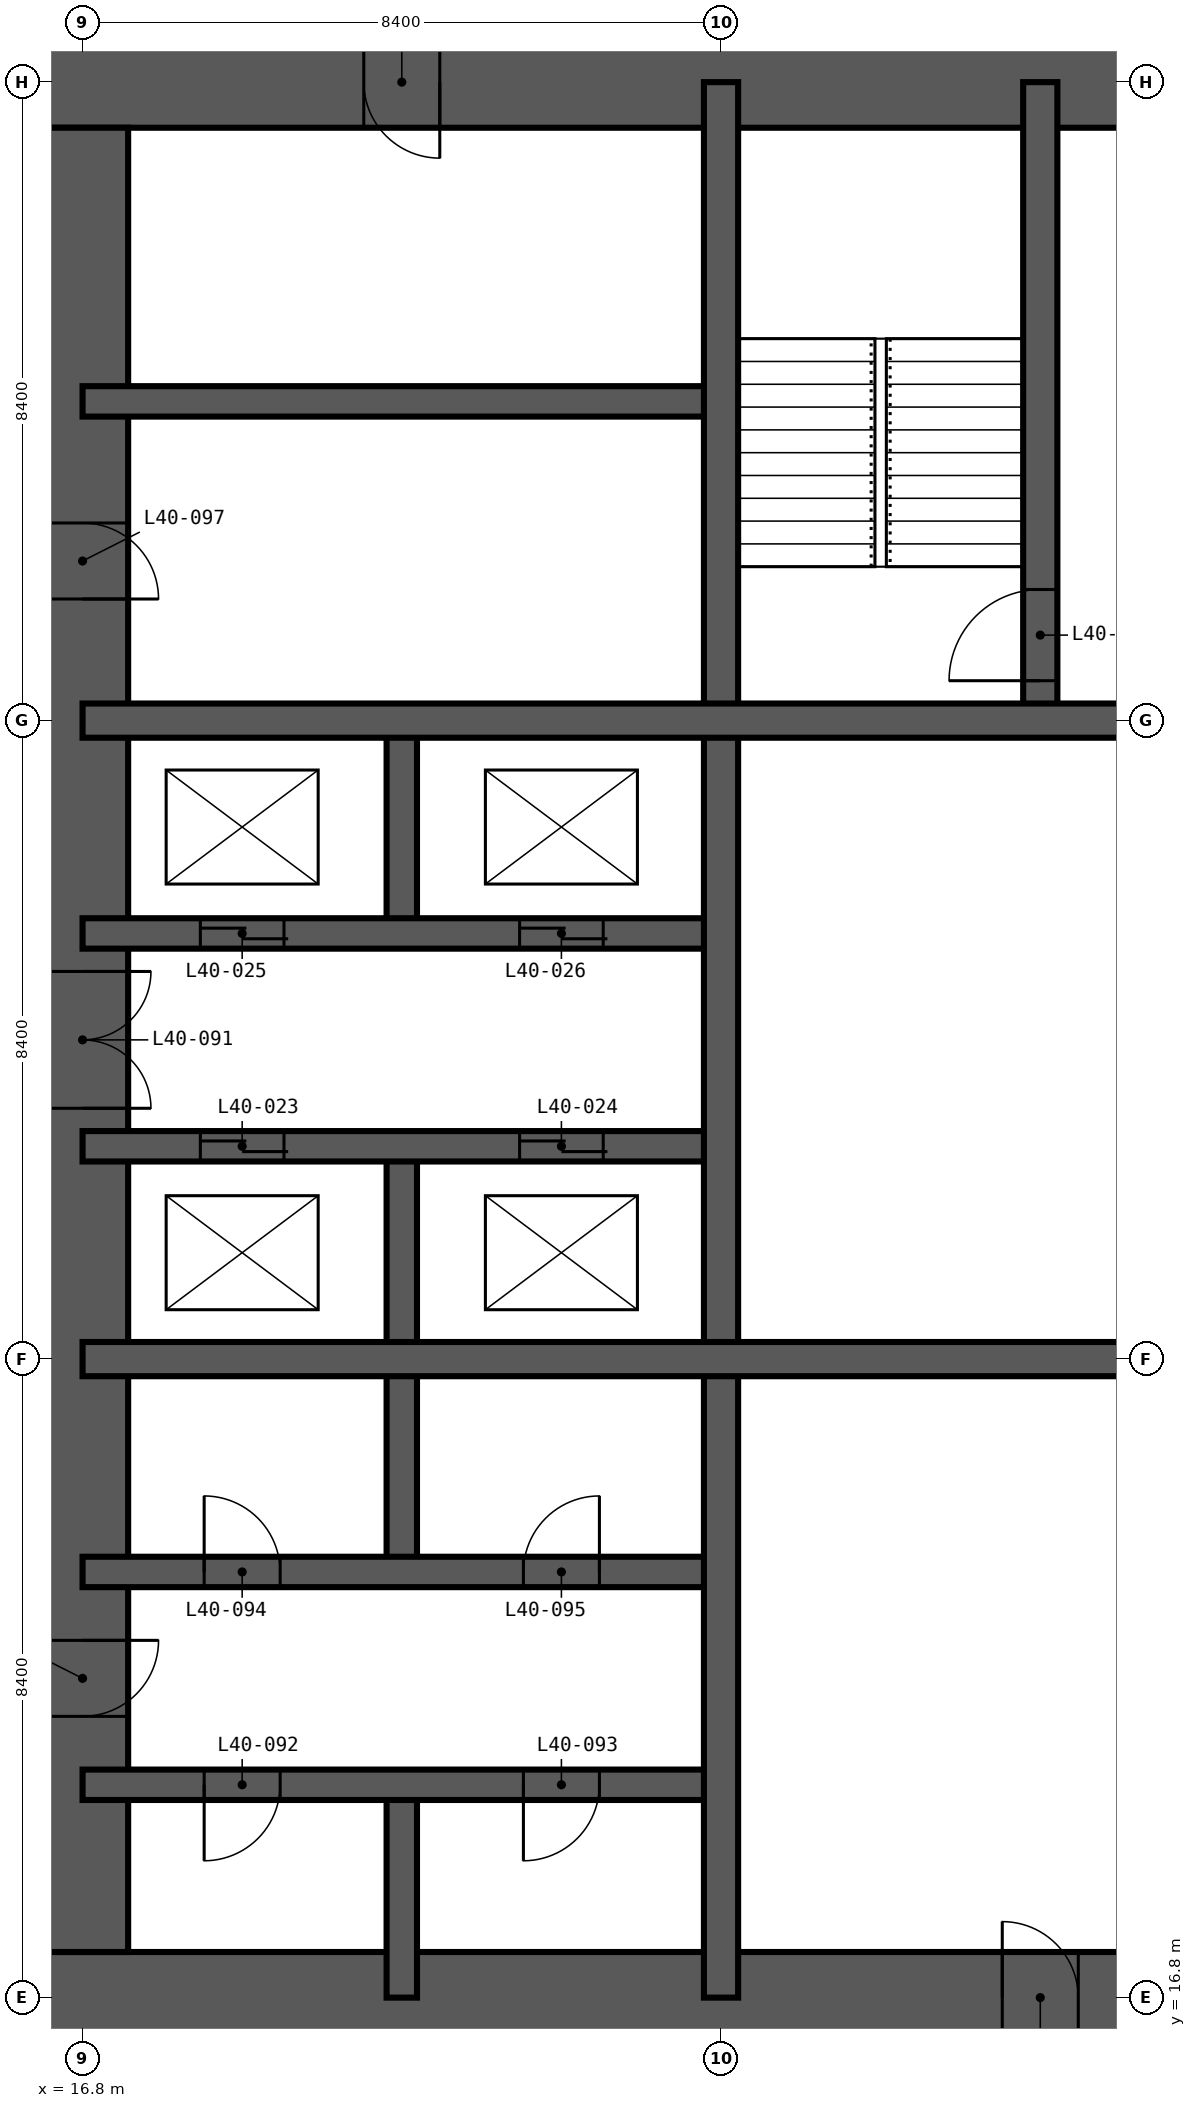
"""IFC4 building model, lengths in metres.
Left out: names, types, materials, properties, quantities, classifications, styles, units other than length and angle.
Written with IfcOpenShell. Run it as: python <this file> out.ifc"""

import sys

from ifc_helpers import new_model, si_unit, direction, frame, frame_2d, origin, place, context, subcontext, project, spatial, rectangle, extrude, element, fill, save


model = new_model("IFC4")
c1 = context("Model", 3, precision=1e-05, world=origin(), true_north=direction((0.0, 1.0)))
c2 = subcontext(c1, "Body", "Model", "MODEL_VIEW")
j1 = project(units=[si_unit("LENGTHUNIT", "METRE"), si_unit("PLANEANGLEUNIT", "RADIAN")], contexts=[c1])
p1 = place(None, origin())
s1 = spatial("IfcSite", under=j1, at=p1, CompositionType="ELEMENT")
p2 = place(p1, origin())
s2 = spatial("IfcBuilding", under=s1, at=p2, CompositionType="ELEMENT")
p3 = place(p2, frame((0.0, 0.0, 159.0)))
s3 = spatial("IfcBuildingStorey", under=s2, at=p3, CompositionType="ELEMENT", Elevation=159.0)
p4 = place(p3, frame((16.2, 16.8, -0.35), z_axis=(0.0, 0.0, 1.0), x_axis=(1.0, 0.0, 0.0)))
e1 = element("IfcWall", 1, at=p4, inside=s3, PredefinedType="SHEAR", context=c2, shape_type="SweptSolid", body=[
    extrude(rectangle(XDim=26.4, YDim=1.2, at=frame_2d((13.2, 0.0))), origin(), (0.0, 0.0, 1.0), 3.6),
])
p5 = place(p4, frame((12.7, 0.0, 0.35)))
e2 = element("IfcOpeningElement", 2, at=p5, cuts=e1, PredefinedType="OPENING", context=c2, shape_type="SweptSolid", body=[
    extrude(rectangle(XDim=1.0, YDim=2.1, at=frame_2d((0.5, 1.05))), frame((0.0, 0.61, 0.0), z_axis=(0.0, -1.0, 0.0), x_axis=(1.0, 0.0, 0.0)), (0.0, 0.0, 1.0), 1.22),
])
p6 = place(p4, frame((19.0, 0.0, 0.35)))
e3 = element("IfcOpeningElement", 3, at=p6, cuts=e1, PredefinedType="OPENING", context=c2, shape_type="SweptSolid", body=[
    extrude(rectangle(XDim=1.0, YDim=2.1, at=frame_2d((0.5, 1.05))), frame((0.0, 0.61, 0.0), z_axis=(0.0, -1.0, 0.0), x_axis=(1.0, 0.0, 0.0)), (0.0, 0.0, 1.0), 1.22),
])
p7 = place(p3, frame((42.6, 42.0, -0.35), z_axis=(0.0, 0.0, 1.0), x_axis=(-1.0, 0.0, 0.0)))
e4 = element("IfcWall", 4, at=p7, inside=s3, PredefinedType="SHEAR", context=c2, shape_type="SweptSolid", body=[
    extrude(rectangle(XDim=26.4, YDim=1.2, at=frame_2d((13.2, 0.0))), origin(), (0.0, 0.0, 1.0), 3.6),
])
p8 = place(p7, frame((21.1, 0.0, 0.35)))
e5 = element("IfcOpeningElement", 5, at=p8, cuts=e4, PredefinedType="OPENING", context=c2, shape_type="SweptSolid", body=[
    extrude(rectangle(XDim=1.0, YDim=2.1, at=frame_2d((0.5, 1.05))), frame((0.0, 0.61, 0.0), z_axis=(0.0, -1.0, 0.0), x_axis=(1.0, 0.0, 0.0)), (0.0, 0.0, 1.0), 1.22),
])
p9 = place(p7, frame((10.5, 0.0, 0.35)))
e6 = element("IfcOpeningElement", 6, at=p9, cuts=e4, PredefinedType="OPENING", context=c2, shape_type="SweptSolid", body=[
    extrude(rectangle(XDim=1.2, YDim=2.2, at=frame_2d((0.6, 1.1))), frame((0.0, 0.61, 0.0), z_axis=(0.0, -1.0, 0.0), x_axis=(1.0, 0.0, 0.0)), (0.0, 0.0, 1.0), 1.22),
])
p10 = place(p3, frame((16.8, 41.4, -0.35), z_axis=(0.0, 0.0, 1.0), x_axis=(0.0, -1.0, 0.0)))
e7 = element("IfcWall", 7, at=p10, inside=s3, PredefinedType="SHEAR", context=c2, shape_type="SweptSolid", body=[
    extrude(rectangle(XDim=24.0, YDim=1.2, at=frame_2d((12.0, 0.0))), origin(), (0.0, 0.0, 1.0), 3.6),
])
p11 = place(p10, frame((11.1, 0.0, 0.35)))
e8 = element("IfcOpeningElement", 8, at=p11, cuts=e7, PredefinedType="OPENING", context=c2, shape_type="SweptSolid", body=[
    extrude(rectangle(XDim=1.8, YDim=2.2, at=frame_2d((0.9, 1.1))), frame((0.0, 0.61, 0.0), z_axis=(0.0, -1.0, 0.0), x_axis=(1.0, 0.0, 0.0)), (0.0, 0.0, 1.0), 1.22),
])
p12 = place(p10, frame((19.9, 0.0, 0.35)))
e9 = element("IfcOpeningElement", 9, at=p12, cuts=e7, PredefinedType="OPENING", context=c2, shape_type="SweptSolid", body=[
    extrude(rectangle(XDim=1.0, YDim=2.1, at=frame_2d((0.5, 1.05))), frame((0.0, 0.61, 0.0), z_axis=(0.0, -1.0, 0.0), x_axis=(1.0, 0.0, 0.0)), (0.0, 0.0, 1.0), 1.22),
])
p13 = place(p10, frame((5.2, 0.0, 0.35)))
e10 = element("IfcOpeningElement", 10, at=p13, cuts=e7, PredefinedType="OPENING", context=c2, shape_type="SweptSolid", body=[
    extrude(rectangle(XDim=1.0, YDim=2.1, at=frame_2d((0.5, 1.05))), frame((0.0, 0.61, 0.0), z_axis=(0.0, -1.0, 0.0), x_axis=(1.0, 0.0, 0.0)), (0.0, 0.0, 1.0), 1.22),
])
p14 = place(p3, frame((21.0, 16.8, -0.35), z_axis=(0.0, 0.0, 1.0), x_axis=(0.0, 1.0, 0.0)))
e11 = element("IfcWall", 11, at=p14, inside=s3, PredefinedType="SHEAR", context=c2, shape_type="SweptSolid", body=[
    extrude(rectangle(XDim=2.8, YDim=0.4, at=frame_2d((1.4, 0.0))), origin(), (0.0, 0.0, 1.0), 3.6),
])
p15 = place(p3, frame((21.0, 22.4, -0.35), z_axis=(0.0, 0.0, 1.0), x_axis=(0.0, 1.0, 0.0)))
e12 = element("IfcWall", 12, at=p15, inside=s3, PredefinedType="SHEAR", context=c2, shape_type="SweptSolid", body=[
    extrude(rectangle(XDim=5.6, YDim=0.4, at=frame_2d((2.8, 0.0))), origin(), (0.0, 0.0, 1.0), 3.6),
])
p16 = place(p3, frame((21.0, 30.8, -0.35), z_axis=(0.0, 0.0, 1.0), x_axis=(0.0, 1.0, 0.0)))
e13 = element("IfcWall", 13, at=p16, inside=s3, PredefinedType="SHEAR", context=c2, shape_type="SweptSolid", body=[
    extrude(rectangle(XDim=2.8, YDim=0.4, at=frame_2d((1.4, 0.0))), origin(), (0.0, 0.0, 1.0), 3.6),
])
p17 = place(p3, frame((16.8, 19.6, -0.35), z_axis=(0.0, 0.0, 1.0), x_axis=(1.0, 0.0, 0.0)))
e14 = element("IfcWall", 14, at=p17, inside=s3, PredefinedType="SHEAR", context=c2, shape_type="SweptSolid", body=[
    extrude(rectangle(XDim=8.4, YDim=0.4, at=frame_2d((4.2, 0.0))), origin(), (0.0, 0.0, 1.0), 3.6),
])
p18 = place(p17, frame((1.6, 0.0, 0.35)))
e15 = element("IfcOpeningElement", 15, at=p18, cuts=e14, PredefinedType="OPENING", context=c2, shape_type="SweptSolid", body=[
    extrude(rectangle(XDim=1.0, YDim=2.1, at=frame_2d((0.5, 1.05))), frame((0.0, 0.21, 0.0), z_axis=(0.0, -1.0, 0.0), x_axis=(1.0, 0.0, 0.0)), (0.0, 0.0, 1.0), 0.42),
])
p19 = place(p17, frame((5.8, 0.0, 0.35)))
e16 = element("IfcOpeningElement", 16, at=p19, cuts=e14, PredefinedType="OPENING", context=c2, shape_type="SweptSolid", body=[
    extrude(rectangle(XDim=1.0, YDim=2.1, at=frame_2d((0.5, 1.05))), frame((0.0, 0.21, 0.0), z_axis=(0.0, -1.0, 0.0), x_axis=(1.0, 0.0, 0.0)), (0.0, 0.0, 1.0), 0.42),
])
p20 = place(p3, frame((16.8, 22.4, -0.35), z_axis=(0.0, 0.0, 1.0), x_axis=(1.0, 0.0, 0.0)))
e17 = element("IfcWall", 17, at=p20, inside=s3, PredefinedType="SHEAR", context=c2, shape_type="SweptSolid", body=[
    extrude(rectangle(XDim=8.4, YDim=0.4, at=frame_2d((4.2, 0.0))), origin(), (0.0, 0.0, 1.0), 3.6),
])
p21 = place(p20, frame((1.6, 0.0, 0.35)))
e18 = element("IfcOpeningElement", 18, at=p21, cuts=e17, PredefinedType="OPENING", context=c2, shape_type="SweptSolid", body=[
    extrude(rectangle(XDim=1.0, YDim=2.1, at=frame_2d((0.5, 1.05))), frame((0.0, 0.21, 0.0), z_axis=(0.0, -1.0, 0.0), x_axis=(1.0, 0.0, 0.0)), (0.0, 0.0, 1.0), 0.42),
])
p22 = place(p20, frame((5.8, 0.0, 0.35)))
e19 = element("IfcOpeningElement", 19, at=p22, cuts=e17, PredefinedType="OPENING", context=c2, shape_type="SweptSolid", body=[
    extrude(rectangle(XDim=1.0, YDim=2.1, at=frame_2d((0.5, 1.05))), frame((0.0, 0.21, 0.0), z_axis=(0.0, -1.0, 0.0), x_axis=(1.0, 0.0, 0.0)), (0.0, 0.0, 1.0), 0.42),
])
p23 = place(p3, frame((16.8, 28.0, -0.35), z_axis=(0.0, 0.0, 1.0), x_axis=(1.0, 0.0, 0.0)))
e20 = element("IfcWall", 20, at=p23, inside=s3, PredefinedType="SHEAR", context=c2, shape_type="SweptSolid", body=[
    extrude(rectangle(XDim=8.4, YDim=0.4, at=frame_2d((4.2, 0.0))), origin(), (0.0, 0.0, 1.0), 3.6),
])
p24 = place(p23, frame((1.55, 0.0, 0.35)))
e21 = element("IfcOpeningElement", 21, at=p24, cuts=e20, PredefinedType="OPENING", context=c2, shape_type="SweptSolid", body=[
    extrude(rectangle(XDim=1.1, YDim=2.2, at=frame_2d((0.55, 1.1))), frame((0.0, 0.21, 0.0), z_axis=(0.0, -1.0, 0.0), x_axis=(1.0, 0.0, 0.0)), (0.0, 0.0, 1.0), 0.42),
])
p25 = place(p23, frame((5.75, 0.0, 0.35)))
e22 = element("IfcOpeningElement", 22, at=p25, cuts=e20, PredefinedType="OPENING", context=c2, shape_type="SweptSolid", body=[
    extrude(rectangle(XDim=1.1, YDim=2.2, at=frame_2d((0.55, 1.1))), frame((0.0, 0.21, 0.0), z_axis=(0.0, -1.0, 0.0), x_axis=(1.0, 0.0, 0.0)), (0.0, 0.0, 1.0), 0.42),
])
p26 = place(p3, frame((16.8, 30.8, -0.35), z_axis=(0.0, 0.0, 1.0), x_axis=(1.0, 0.0, 0.0)))
e23 = element("IfcWall", 23, at=p26, inside=s3, PredefinedType="SHEAR", context=c2, shape_type="SweptSolid", body=[
    extrude(rectangle(XDim=8.4, YDim=0.4, at=frame_2d((4.2, 0.0))), origin(), (0.0, 0.0, 1.0), 3.6),
])
p27 = place(p26, frame((1.55, 0.0, 0.35)))
e24 = element("IfcOpeningElement", 24, at=p27, cuts=e23, PredefinedType="OPENING", context=c2, shape_type="SweptSolid", body=[
    extrude(rectangle(XDim=1.1, YDim=2.2, at=frame_2d((0.55, 1.1))), frame((0.0, 0.21, 0.0), z_axis=(0.0, -1.0, 0.0), x_axis=(1.0, 0.0, 0.0)), (0.0, 0.0, 1.0), 0.42),
])
p28 = place(p26, frame((5.75, 0.0, 0.35)))
e25 = element("IfcOpeningElement", 25, at=p28, cuts=e23, PredefinedType="OPENING", context=c2, shape_type="SweptSolid", body=[
    extrude(rectangle(XDim=1.1, YDim=2.2, at=frame_2d((0.55, 1.1))), frame((0.0, 0.21, 0.0), z_axis=(0.0, -1.0, 0.0), x_axis=(1.0, 0.0, 0.0)), (0.0, 0.0, 1.0), 0.42),
])
p29 = place(p3, frame((16.8, 37.8, -0.35), z_axis=(0.0, 0.0, 1.0), x_axis=(1.0, 0.0, 0.0)))
e26 = element("IfcWall", 26, at=p29, inside=s3, PredefinedType="SHEAR", context=c2, shape_type="SweptSolid", body=[
    extrude(rectangle(XDim=8.4, YDim=0.4, at=frame_2d((4.2, 0.0))), origin(), (0.0, 0.0, 1.0), 3.6),
])
p30 = place(p3, frame((25.2, 16.8, -0.35), z_axis=(0.0, 0.0, 1.0), x_axis=(0.0, 1.0, 0.0)))
e27 = element("IfcWall", 27, at=p30, inside=s3, PredefinedType="SHEAR", context=c2, shape_type="SweptSolid", body=[
    extrude(rectangle(XDim=25.2, YDim=0.45, at=frame_2d((12.6, 0.0))), origin(), (0.0, 0.0, 1.0), 3.6),
])
p31 = place(p3, frame((29.4, 33.6, -0.35), z_axis=(0.0, 0.0, 1.0), x_axis=(0.0, 1.0, 0.0)))
e28 = element("IfcWall", 28, at=p31, inside=s3, PredefinedType="SHEAR", context=c2, shape_type="SweptSolid", body=[
    extrude(rectangle(XDim=8.4, YDim=0.45, at=frame_2d((4.2, 0.0))), origin(), (0.0, 0.0, 1.0), 3.6),
])
p32 = place(p31, frame((0.525, 0.0, 0.35)))
e29 = element("IfcOpeningElement", 29, at=p32, cuts=e28, PredefinedType="OPENING", context=c2, shape_type="SweptSolid", body=[
    extrude(rectangle(XDim=1.2, YDim=2.2, at=frame_2d((0.6, 1.1))), frame((0.0, 0.235, 0.0), z_axis=(0.0, -1.0, 0.0), x_axis=(1.0, 0.0, 0.0)), (0.0, 0.0, 1.0), 0.47),
])
for number, where, z_axis, x_axis in (
    (30, (16.8, 25.2, -0.35), (0.0, 0.0, 1.0), (1.0, 0.0, 0.0)),
    (31, (16.8, 33.6, -0.35), (0.0, 0.0, 1.0), (1.0, 0.0, 0.0)),
):
    element("IfcWall", number, at=place(p3, frame(where, z_axis=z_axis, x_axis=x_axis)), inside=s3, PredefinedType="SHEAR", context=c2, shape_type="SweptSolid", body=[
        extrude(rectangle(XDim=25.2, YDim=0.45, at=frame_2d((12.6, 0.0))), origin(), (0.0, 0.0, 1.0), 3.6),
    ])
p33 = place(p32, origin())
e32 = element("IfcDoor", 32, at=p33, inside=s3, OperationType="SINGLE_SWING_LEFT", PredefinedType="DOOR", context=c2, shape_type="SweptSolid", body=[
    extrude(rectangle(XDim=1.2, YDim=2.2, at=frame_2d((0.6, 1.1))), frame((0.0, 0.025, 0.0), z_axis=(0.0, -1.0, 0.0), x_axis=(1.0, 0.0, 0.0)), (0.0, 0.0, 1.0), 0.05),
])
fill(e29, e32)
p34 = place(p24, origin())
e33 = element("IfcDoor", 33, at=p34, inside=s3, OperationType="DOUBLE_DOOR_SLIDING", PredefinedType="DOOR", context=c2, shape_type="SweptSolid", body=[
    extrude(rectangle(XDim=1.1, YDim=2.2, at=frame_2d((0.55, 1.1))), frame((0.0, 0.025, 0.0), z_axis=(0.0, -1.0, 0.0), x_axis=(1.0, 0.0, 0.0)), (0.0, 0.0, 1.0), 0.05),
])
fill(e21, e33)
p35 = place(p25, origin())
e34 = element("IfcDoor", 34, at=p35, inside=s3, OperationType="DOUBLE_DOOR_SLIDING", PredefinedType="DOOR", context=c2, shape_type="SweptSolid", body=[
    extrude(rectangle(XDim=1.1, YDim=2.2, at=frame_2d((0.55, 1.1))), frame((0.0, 0.025, 0.0), z_axis=(0.0, -1.0, 0.0), x_axis=(1.0, 0.0, 0.0)), (0.0, 0.0, 1.0), 0.05),
])
fill(e22, e34)
p36 = place(p27, origin())
e35 = element("IfcDoor", 35, at=p36, inside=s3, OperationType="DOUBLE_DOOR_SLIDING", PredefinedType="DOOR", context=c2, shape_type="SweptSolid", body=[
    extrude(rectangle(XDim=1.1, YDim=2.2, at=frame_2d((0.55, 1.1))), frame((0.0, 0.025, 0.0), z_axis=(0.0, -1.0, 0.0), x_axis=(1.0, 0.0, 0.0)), (0.0, 0.0, 1.0), 0.05),
])
fill(e24, e35)
p37 = place(p28, origin())
e36 = element("IfcDoor", 36, at=p37, inside=s3, OperationType="DOUBLE_DOOR_SLIDING", PredefinedType="DOOR", context=c2, shape_type="SweptSolid", body=[
    extrude(rectangle(XDim=1.1, YDim=2.2, at=frame_2d((0.55, 1.1))), frame((0.0, 0.025, 0.0), z_axis=(0.0, -1.0, 0.0), x_axis=(1.0, 0.0, 0.0)), (0.0, 0.0, 1.0), 0.05),
])
fill(e25, e36)
p38 = place(p11, origin())
e37 = element("IfcDoor", 37, at=p38, inside=s3, OperationType="DOUBLE_DOOR_DOUBLE_SWING", PredefinedType="DOOR", context=c2, shape_type="SweptSolid", body=[
    extrude(rectangle(XDim=1.8, YDim=2.2, at=frame_2d((0.9, 1.1))), frame((0.0, 0.025, 0.0), z_axis=(0.0, -1.0, 0.0), x_axis=(1.0, 0.0, 0.0)), (0.0, 0.0, 1.0), 0.05),
])
fill(e8, e37)
p39 = place(p18, frame((1.0, 0.0, 0.0), z_axis=(0.0, 0.0, 1.0), x_axis=(-1.0, 0.0, 0.0)))
e38 = element("IfcDoor", 38, at=p39, inside=s3, OperationType="SINGLE_SWING_RIGHT", PredefinedType="DOOR", context=c2, shape_type="SweptSolid", body=[
    extrude(rectangle(XDim=1.0, YDim=2.1, at=frame_2d((0.5, 1.05))), frame((0.0, 0.025, 0.0), z_axis=(0.0, -1.0, 0.0), x_axis=(1.0, 0.0, 0.0)), (0.0, 0.0, 1.0), 0.05),
])
fill(e15, e38)
p40 = place(p19, frame((1.0, 0.0, 0.0), z_axis=(0.0, 0.0, 1.0), x_axis=(-1.0, 0.0, 0.0)))
e39 = element("IfcDoor", 39, at=p40, inside=s3, OperationType="SINGLE_SWING_RIGHT", PredefinedType="DOOR", context=c2, shape_type="SweptSolid", body=[
    extrude(rectangle(XDim=1.0, YDim=2.1, at=frame_2d((0.5, 1.05))), frame((0.0, 0.025, 0.0), z_axis=(0.0, -1.0, 0.0), x_axis=(1.0, 0.0, 0.0)), (0.0, 0.0, 1.0), 0.05),
])
fill(e16, e39)
p41 = place(p21, origin())
e40 = element("IfcDoor", 40, at=p41, inside=s3, OperationType="SINGLE_SWING_LEFT", PredefinedType="DOOR", context=c2, shape_type="SweptSolid", body=[
    extrude(rectangle(XDim=1.0, YDim=2.1, at=frame_2d((0.5, 1.05))), frame((0.0, 0.025, 0.0), z_axis=(0.0, -1.0, 0.0), x_axis=(1.0, 0.0, 0.0)), (0.0, 0.0, 1.0), 0.05),
])
fill(e18, e40)
p42 = place(p22, origin())
e41 = element("IfcDoor", 41, at=p42, inside=s3, OperationType="SINGLE_SWING_RIGHT", PredefinedType="DOOR", context=c2, shape_type="SweptSolid", body=[
    extrude(rectangle(XDim=1.0, YDim=2.1, at=frame_2d((0.5, 1.05))), frame((0.0, 0.025, 0.0), z_axis=(0.0, -1.0, 0.0), x_axis=(1.0, 0.0, 0.0)), (0.0, 0.0, 1.0), 0.05),
])
fill(e19, e41)
p43 = place(p12, origin())
e42 = element("IfcDoor", 42, at=p43, inside=s3, OperationType="SINGLE_SWING_LEFT", PredefinedType="DOOR", context=c2, shape_type="SweptSolid", body=[
    extrude(rectangle(XDim=1.0, YDim=2.1, at=frame_2d((0.5, 1.05))), frame((0.0, 0.025, 0.0), z_axis=(0.0, -1.0, 0.0), x_axis=(1.0, 0.0, 0.0)), (0.0, 0.0, 1.0), 0.05),
])
fill(e9, e42)
p44 = place(p13, origin())
e43 = element("IfcDoor", 43, at=p44, inside=s3, OperationType="SINGLE_SWING_RIGHT", PredefinedType="DOOR", context=c2, shape_type="SweptSolid", body=[
    extrude(rectangle(XDim=1.0, YDim=2.1, at=frame_2d((0.5, 1.05))), frame((0.0, 0.025, 0.0), z_axis=(0.0, -1.0, 0.0), x_axis=(1.0, 0.0, 0.0)), (0.0, 0.0, 1.0), 0.05),
])
fill(e10, e43)
p45 = place(p8, origin())
e44 = element("IfcDoor", 44, at=p45, inside=s3, OperationType="SINGLE_SWING_LEFT", PredefinedType="DOOR", context=c2, shape_type="SweptSolid", body=[
    extrude(rectangle(XDim=1.0, YDim=2.1, at=frame_2d((0.5, 1.05))), frame((0.0, 0.025, 0.0), z_axis=(0.0, -1.0, 0.0), x_axis=(1.0, 0.0, 0.0)), (0.0, 0.0, 1.0), 0.05),
])
fill(e5, e44)
p46 = place(p5, origin())
e45 = element("IfcDoor", 45, at=p46, inside=s3, OperationType="SINGLE_SWING_LEFT", PredefinedType="DOOR", context=c2, shape_type="SweptSolid", body=[
    extrude(rectangle(XDim=1.0, YDim=2.1, at=frame_2d((0.5, 1.05))), frame((0.0, 0.025, 0.0), z_axis=(0.0, -1.0, 0.0), x_axis=(1.0, 0.0, 0.0)), (0.0, 0.0, 1.0), 0.05),
])
fill(e2, e45)
save(model, sys.argv[1])
